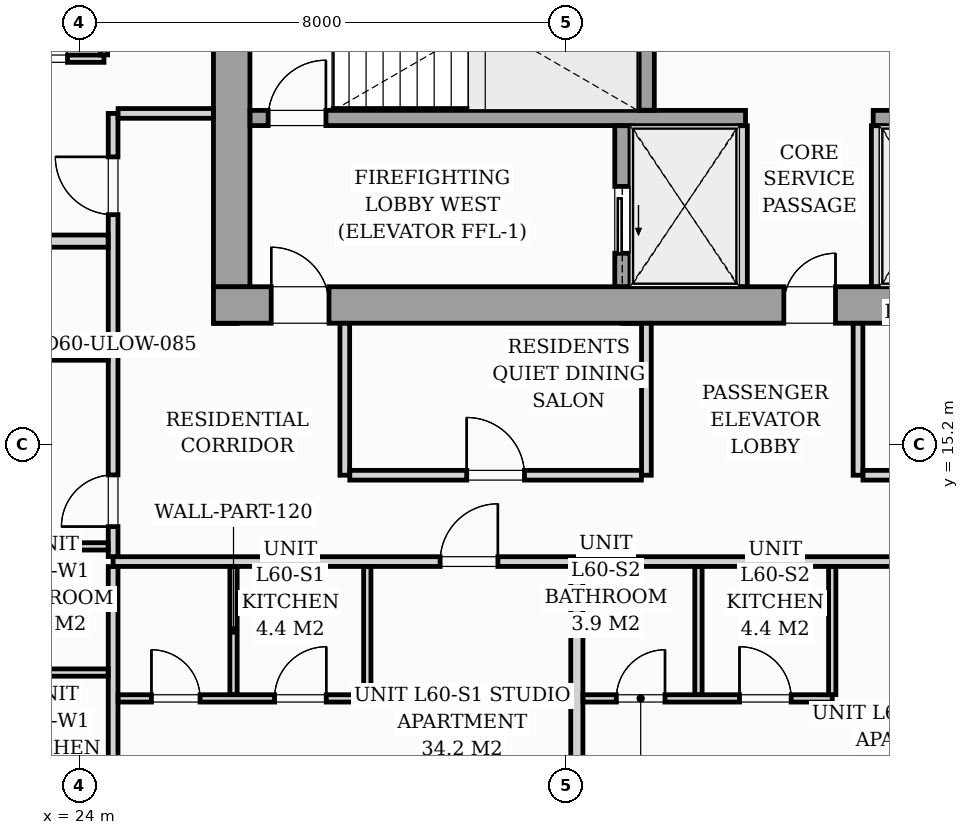
"""IFC4 building model, lengths in metres.
Left out: names, types, materials, properties, quantities, classifications, styles, units other than length and angle.
Written with IfcOpenShell. Run it as: python <this file> out.ifc"""

import sys

from ifc_helpers import new_model, si_unit, direction, frame, frame_2d, origin, origin_2d, place, context, subcontext, project, spatial, rectangle, i_section, extrude, source, transform, mapped, element, fill, save


model = new_model("IFC4")
c1 = context("Model", 3, precision=1e-05, world=origin(), true_north=direction((0.0, 1.0)))
c2 = subcontext(c1, "Body", "Model", "MODEL_VIEW")
j1 = project(units=[si_unit("LENGTHUNIT", "METRE"), si_unit("PLANEANGLEUNIT", "RADIAN")], contexts=[c1])
p1 = place(None, origin())
s1 = spatial("IfcSite", under=j1, at=p1, CompositionType="ELEMENT")
p2 = place(p1, origin())
s2 = spatial("IfcBuilding", under=s1, at=p2, CompositionType="ELEMENT")
p3 = place(p2, frame((0.0, 0.0, 208.2)))
s3 = spatial("IfcBuildingStorey", under=s2, at=p3, CompositionType="ELEMENT", Elevation=208.2)
m1 = source(origin(), c2, "Body", "SweptSolid", [
    extrude(i_section(OverallWidth=0.416, OverallDepth=0.446, WebThickness=0.039, FlangeThickness=0.063, FilletRadius=0.018, at=origin_2d()), origin(), (0.0, 0.0, 1.0), 3.196),
])
for number, where, z_axis, x_axis in (
    (1, (26.4, 17.4, 0.002), (0.0, 0.0, 1.0), (1.0, 0.0, 0.0)),
    (2, (33.12, 17.4, 0.002), (0.0, 0.0, 1.0), (1.0, 0.0, 0.0)),
):
    element("IfcColumn", number, at=place(p3, frame(where, z_axis=z_axis, x_axis=x_axis)), inside=s3, PredefinedType="PILASTER", context=c2, shape_type="MappedRepresentation", body=[
        mapped(m1, transform((0.0, 0.0, 0.0), scale=1.0)),
    ])
p4 = place(p3, frame((26.2, 17.5, 0.0), z_axis=(0.0, 0.0, 1.0), x_axis=(1.0, 0.0, 0.0)))
e3 = element("IfcWall", 3, at=p4, inside=s3, PredefinedType="SHEAR", context=c2, shape_type="SweptSolid", body=[
    extrude(rectangle(XDim=19.6, YDim=0.6, at=frame_2d((9.8, 0.0))), origin(), (0.0, 0.0, 1.0), 3.2),
])
p5 = place(p4, frame((0.95, 0.0, 0.0)))
e4 = element("IfcOpeningElement", 4, at=p5, cuts=e3, PredefinedType="OPENING", context=c2, shape_type="SweptSolid", body=[
    extrude(rectangle(XDim=0.95, YDim=2.06, at=frame_2d((0.475, 1.03))), frame((0.0, 0.31, 0.0), z_axis=(0.0, -1.0, 0.0), x_axis=(1.0, 0.0, 0.0)), (0.0, 0.0, 1.0), 0.62),
])
p6 = place(p4, frame((9.38, 0.0, 0.0)))
e5 = element("IfcOpeningElement", 5, at=p6, cuts=e3, PredefinedType="OPENING", context=c2, shape_type="SweptSolid", body=[
    extrude(rectangle(XDim=0.85, YDim=2.0, at=frame_2d((0.425, 1.0))), frame((0.0, 0.31, 0.0), z_axis=(0.0, -1.0, 0.0), x_axis=(1.0, 0.0, 0.0)), (0.0, 0.0, 1.0), 0.62),
])
p7 = place(p4, frame((17.55, 0.0, 0.0)))
e6 = element("IfcOpeningElement", 6, at=p7, cuts=e3, PredefinedType="OPENING", context=c2, shape_type="SweptSolid", body=[
    extrude(rectangle(XDim=0.95, YDim=2.06, at=frame_2d((0.475, 1.03))), frame((0.0, 0.31, 0.0), z_axis=(0.0, -1.0, 0.0), x_axis=(1.0, 0.0, 0.0)), (0.0, 0.0, 1.0), 0.62),
])
p8 = place(p3, frame((26.5, 17.802, 0.0), z_axis=(0.0, 0.0, 1.0), x_axis=(0.0, 1.0, 0.0)))
e7 = element("IfcWall", 7, at=p8, inside=s3, PredefinedType="SHEAR", context=c2, shape_type="SweptSolid", body=[
    extrude(rectangle(XDim=5.796, YDim=0.6, at=frame_2d((2.898, 0.0))), origin(), (0.0, 0.0, 1.0), 3.2),
])
p9 = place(p3, frame((26.802, 20.575, 0.0), z_axis=(0.0, 0.0, 1.0), x_axis=(1.0, 0.0, 0.0)))
e8 = element("IfcWall", 8, at=p9, inside=s3, PredefinedType="SOLIDWALL", context=c2, shape_type="SweptSolid", body=[
    extrude(rectangle(XDim=8.148, YDim=0.25, at=frame_2d((4.074, 0.0))), origin(), (0.0, 0.0, 1.0), 3.2),
])
p10 = place(p9, frame((0.298, 0.0, 0.0)))
e9 = element("IfcOpeningElement", 9, at=p10, cuts=e8, PredefinedType="OPENING", context=c2, shape_type="SweptSolid", body=[
    extrude(rectangle(XDim=0.95, YDim=2.06, at=frame_2d((0.475, 1.03))), frame((0.0, 0.135, 0.0), z_axis=(0.0, -1.0, 0.0), x_axis=(1.0, 0.0, 0.0)), (0.0, 0.0, 1.0), 0.27),
])
p11 = place(p3, frame((37.05, 20.575, 0.0), z_axis=(0.0, 0.0, 1.0), x_axis=(1.0, 0.0, 0.0)))
e10 = element("IfcWall", 10, at=p11, inside=s3, PredefinedType="SOLIDWALL", context=c2, shape_type="SweptSolid", body=[
    extrude(rectangle(XDim=8.148, YDim=0.25, at=frame_2d((4.074, 0.0))), origin(), (0.0, 0.0, 1.0), 3.2),
])
p12 = place(p11, frame((6.6, 0.0, 0.0)))
e11 = element("IfcOpeningElement", 11, at=p12, cuts=e10, PredefinedType="OPENING", context=c2, shape_type="SweptSolid", body=[
    extrude(rectangle(XDim=0.95, YDim=2.06, at=frame_2d((0.475, 1.03))), frame((0.0, 0.135, 0.0), z_axis=(0.0, -1.0, 0.0), x_axis=(1.0, 0.0, 0.0)), (0.0, 0.0, 1.0), 0.27),
])
p13 = place(p3, frame((33.325, 20.702, 0.0), z_axis=(0.0, 0.0, 1.0), x_axis=(0.0, 1.0, 0.0)))
e12 = element("IfcWall", 12, at=p13, inside=s3, PredefinedType="SOLIDWALL", context=c2, shape_type="SweptSolid", body=[
    extrude(rectangle(XDim=2.896, YDim=0.25, at=frame_2d((1.448, 0.0))), origin(), (0.0, 0.0, 1.0), 3.2),
])
p14 = place(p3, frame((32.925, 17.802, 0.0), z_axis=(0.0, 0.0, 1.0), x_axis=(0.0, 1.0, 0.0)))
e13 = element("IfcWall", 13, at=p14, inside=s3, PredefinedType="SOLIDWALL", context=c2, shape_type="SweptSolid", body=[
    extrude(rectangle(XDim=2.646, YDim=0.25, at=frame_2d((1.323, 0.0))), origin(), (0.0, 0.0, 1.0), 3.2),
])
p15 = place(p14, frame((0.548, 0.0, 0.0)))
e14 = element("IfcOpeningElement", 14, at=p15, cuts=e13, PredefinedType="OPENING", context=c2, shape_type="SweptSolid", body=[
    extrude(rectangle(XDim=1.1, YDim=2.08, at=frame_2d((0.55, 1.04))), frame((0.0, 0.135, 0.0), z_axis=(0.0, -1.0, 0.0), x_axis=(1.0, 0.0, 0.0)), (0.0, 0.0, 1.0), 0.27),
])
for number, where, z_axis, x_axis in (
    (15, (34.9, 17.802, 0.0), (0.0, 0.0, 1.0), (0.0, 1.0, 0.0)),
    (16, (37.1, 17.802, 0.0), (0.0, 0.0, 1.0), (0.0, 1.0, 0.0)),
):
    element("IfcWall", number, at=place(p3, frame(where, z_axis=z_axis, x_axis=x_axis)), inside=s3, PredefinedType="PARTITIONING", context=c2, shape_type="SweptSolid", body=[
        extrude(rectangle(XDim=2.646, YDim=0.16, at=frame_2d((1.323, 0.0))), origin(), (0.0, 0.0, 1.0), 2.9),
    ])
p16 = place(p3, frame((24.55, 13.28, 0.0), z_axis=(0.0, 0.0, 1.0), x_axis=(1.0, 0.0, 0.0)))
e17 = element("IfcWall", 17, at=p16, inside=s3, PredefinedType="PARTITIONING", context=c2, shape_type="SweptSolid", body=[
    extrude(rectangle(XDim=22.9, YDim=0.16, at=frame_2d((11.45, 0.0))), origin(), (0.0, 0.0, 1.0), 2.9),
])
p17 = place(p16, frame((5.378, 0.0, 0.0)))
e18 = element("IfcOpeningElement", 18, at=p17, cuts=e17, PredefinedType="OPENING", context=c2, shape_type="SweptSolid", body=[
    extrude(rectangle(XDim=0.95, YDim=2.06, at=frame_2d((0.475, 1.03))), frame((0.0, 0.09, 0.0), z_axis=(0.0, -1.0, 0.0), x_axis=(1.0, 0.0, 0.0)), (0.0, 0.0, 1.0), 0.18),
])
p18 = place(p16, frame((13.025, 0.0, 0.0)))
e19 = element("IfcOpeningElement", 19, at=p18, cuts=e17, PredefinedType="OPENING", context=c2, shape_type="SweptSolid", body=[
    extrude(rectangle(XDim=0.95, YDim=2.06, at=frame_2d((0.475, 1.03))), frame((0.0, 0.09, 0.0), z_axis=(0.0, -1.0, 0.0), x_axis=(1.0, 0.0, 0.0)), (0.0, 0.0, 1.0), 0.18),
])
p19 = place(p16, frame((16.572, 0.0, 0.0)))
e20 = element("IfcOpeningElement", 20, at=p19, cuts=e17, PredefinedType="OPENING", context=c2, shape_type="SweptSolid", body=[
    extrude(rectangle(XDim=0.95, YDim=2.06, at=frame_2d((0.475, 1.03))), frame((0.0, 0.09, 0.0), z_axis=(0.0, -1.0, 0.0), x_axis=(1.0, 0.0, 0.0)), (0.0, 0.0, 1.0), 0.18),
])
p20 = place(p3, frame((24.55, 7.11, 0.0), z_axis=(0.0, 0.0, 1.0), x_axis=(0.0, 1.0, 0.0)))
e21 = element("IfcWall", 21, at=p20, inside=s3, PredefinedType="PARTITIONING", context=c2, shape_type="SweptSolid", body=[
    extrude(rectangle(XDim=6.088, YDim=0.16, at=frame_2d((3.044, 0.0))), origin(), (0.0, 0.0, 1.0), 2.9),
])
p21 = place(p3, frame((24.55, 13.362, 0.0), z_axis=(0.0, 0.0, 1.0), x_axis=(0.0, 1.0, 0.0)))
e22 = element("IfcWall", 22, at=p21, inside=s3, PredefinedType="PARTITIONING", context=c2, shape_type="SweptSolid", body=[
    extrude(rectangle(XDim=7.288, YDim=0.16, at=frame_2d((3.644, 0.0))), origin(), (0.0, 0.0, 1.0), 2.9),
])
p22 = place(p21, frame((0.493, 0.0, 0.0)))
e23 = element("IfcOpeningElement", 23, at=p22, cuts=e22, PredefinedType="OPENING", context=c2, shape_type="SweptSolid", body=[
    extrude(rectangle(XDim=0.85, YDim=2.0, at=frame_2d((0.425, 1.0))), frame((0.0, 0.09, 0.0), z_axis=(0.0, -1.0, 0.0), x_axis=(1.0, 0.0, 0.0)), (0.0, 0.0, 1.0), 0.18),
])
p23 = place(p21, frame((5.623, 0.0, 0.0)))
e24 = element("IfcOpeningElement", 24, at=p23, cuts=e22, PredefinedType="OPENING", context=c2, shape_type="SweptSolid", body=[
    extrude(rectangle(XDim=0.95, YDim=2.06, at=frame_2d((0.475, 1.03))), frame((0.0, 0.09, 0.0), z_axis=(0.0, -1.0, 0.0), x_axis=(1.0, 0.0, 0.0)), (0.0, 0.0, 1.0), 0.18),
])
p24 = place(p3, frame((24.632, 20.65, 0.0), z_axis=(0.0, 0.0, 1.0), x_axis=(1.0, 0.0, 0.0)))
e25 = element("IfcWall", 25, at=p24, inside=s3, PredefinedType="PARTITIONING", context=c2, shape_type="SweptSolid", body=[
    extrude(rectangle(XDim=1.566, YDim=0.16, at=frame_2d((0.783, 0.0))), origin(), (0.0, 0.0, 1.0), 2.9),
])
p25 = place(p3, frame((24.632, 11.03, 0.0), z_axis=(0.0, 0.0, 1.0), x_axis=(1.0, 0.0, 0.0)))
e26 = element("IfcWall", 26, at=p25, inside=s3, PredefinedType="PARTITIONING", context=c2, shape_type="SweptSolid", body=[
    extrude(rectangle(XDim=4.098, YDim=0.12, at=frame_2d((2.049, 0.0))), origin(), (0.0, 0.0, 1.0), 2.9),
])
p26 = place(p25, frame((0.548, 0.0, 0.0)))
e27 = element("IfcOpeningElement", 27, at=p26, cuts=e26, PredefinedType="OPENING", context=c2, shape_type="SweptSolid", body=[
    extrude(rectangle(XDim=0.8, YDim=2.02, at=frame_2d((0.4, 1.01))), frame((0.0, 0.07, 0.0), z_axis=(0.0, -1.0, 0.0), x_axis=(1.0, 0.0, 0.0)), (0.0, 0.0, 1.0), 0.14),
])
p27 = place(p25, frame((2.573, 0.0, 0.0)))
e28 = element("IfcOpeningElement", 28, at=p27, cuts=e26, PredefinedType="OPENING", context=c2, shape_type="SweptSolid", body=[
    extrude(rectangle(XDim=0.85, YDim=2.05, at=frame_2d((0.425, 1.025))), frame((0.0, 0.07, 0.0), z_axis=(0.0, -1.0, 0.0), x_axis=(1.0, 0.0, 0.0)), (0.0, 0.0, 1.0), 0.14),
])
for number, where, z_axis, x_axis in (
    (29, (28.73, 11.092, 0.0), (0.0, 0.0, 1.0), (0.0, 1.0, 0.0)),
    (30, (26.53, 11.092, 0.0), (0.0, 0.0, 1.0), (0.0, 1.0, 0.0)),
):
    element("IfcWall", number, at=place(p3, frame(where, z_axis=z_axis, x_axis=x_axis)), inside=s3, PredefinedType="PARTITIONING", context=c2, shape_type="SweptSolid", body=[
        extrude(rectangle(XDim=2.106, YDim=0.12, at=frame_2d((1.053, 0.0))), origin(), (0.0, 0.0, 1.0), 2.9),
    ])
p28 = place(p3, frame((32.176, 7.844, 0.0), z_axis=(0.0, 0.0, 1.0), x_axis=(0.0, 1.0, 0.0)))
e31 = element("IfcWall", 31, at=p28, inside=s3, PredefinedType="PARTITIONING", context=c2, shape_type="SweptSolid", body=[
    extrude(rectangle(XDim=5.354, YDim=0.2, at=frame_2d((2.677, 0.0))), origin(), (0.0, 0.0, 1.0), 2.9),
])
p29 = place(p3, frame((32.278, 11.03, 0.0), z_axis=(0.0, 0.0, 1.0), x_axis=(1.0, 0.0, 0.0)))
e32 = element("IfcWall", 32, at=p29, inside=s3, PredefinedType="PARTITIONING", context=c2, shape_type="SweptSolid", body=[
    extrude(rectangle(XDim=4.098, YDim=0.12, at=frame_2d((2.049, 0.0))), origin(), (0.0, 0.0, 1.0), 2.9),
])
p30 = place(p29, frame((0.548, 0.0, 0.0)))
e33 = element("IfcOpeningElement", 33, at=p30, cuts=e32, PredefinedType="OPENING", context=c2, shape_type="SweptSolid", body=[
    extrude(rectangle(XDim=0.8, YDim=2.02, at=frame_2d((0.4, 1.01))), frame((0.0, 0.07, 0.0), z_axis=(0.0, -1.0, 0.0), x_axis=(1.0, 0.0, 0.0)), (0.0, 0.0, 1.0), 0.14),
])
p31 = place(p29, frame((2.573, 0.0, 0.0)))
e34 = element("IfcOpeningElement", 34, at=p31, cuts=e32, PredefinedType="OPENING", context=c2, shape_type="SweptSolid", body=[
    extrude(rectangle(XDim=0.85, YDim=2.05, at=frame_2d((0.425, 1.025))), frame((0.0, 0.07, 0.0), z_axis=(0.0, -1.0, 0.0), x_axis=(1.0, 0.0, 0.0)), (0.0, 0.0, 1.0), 0.14),
])
for number, where, z_axis, x_axis in (
    (35, (36.376, 11.092, 0.0), (0.0, 0.0, 1.0), (0.0, 1.0, 0.0)),
    (36, (34.176, 11.092, 0.0), (0.0, 0.0, 1.0), (0.0, 1.0, 0.0)),
):
    element("IfcWall", number, at=place(p3, frame(where, z_axis=z_axis, x_axis=x_axis)), inside=s3, PredefinedType="PARTITIONING", context=c2, shape_type="SweptSolid", body=[
        extrude(rectangle(XDim=2.106, YDim=0.12, at=frame_2d((1.053, 0.0))), origin(), (0.0, 0.0, 1.0), 2.9),
    ])
p32 = place(p3, frame((13.561, 18.55, 0.0), z_axis=(0.0, 0.0, 1.0), x_axis=(1.0, 0.0, 0.0)))
e37 = element("IfcWall", 37, at=p32, inside=s3, PredefinedType="PARTITIONING", context=c2, shape_type="SweptSolid", body=[
    extrude(rectangle(XDim=10.907, YDim=0.2, at=frame_2d((5.453, 0.0))), origin(), (0.0, 0.0, 1.0), 2.9),
])
for number, where, z_axis, x_axis in (
    (38, (22.212, 11.455, 0.0), (0.0, 0.0, 1.0), (1.0, 0.0, 0.0)),
    (39, (22.212, 13.53, 0.0), (0.0, 0.0, 1.0), (1.0, 0.0, 0.0)),
):
    element("IfcWall", number, at=place(p3, frame(where, z_axis=z_axis, x_axis=x_axis)), inside=s3, PredefinedType="PARTITIONING", context=c2, shape_type="SweptSolid", body=[
        extrude(rectangle(XDim=2.256, YDim=0.12, at=frame_2d((1.128, 0.0))), origin(), (0.0, 0.0, 1.0), 2.9),
    ])
p33 = place(p3, frame((16.813, 16.651, 0.0), z_axis=(0.0, 0.0, 1.0), x_axis=(1.0, 0.0, 0.0)))
e40 = element("IfcWall", 40, at=p33, inside=s3, PredefinedType="PARTITIONING", context=c2, shape_type="SweptSolid", body=[
    extrude(rectangle(XDim=7.655, YDim=0.12, at=frame_2d((3.828, 0.0))), origin(), (0.0, 0.0, 1.0), 2.241),
])
p34 = place(p33, frame((3.403, 0.0, 0.0)))
e41 = element("IfcOpeningElement", 41, at=p34, cuts=e40, PredefinedType="OPENING", context=c2, shape_type="SweptSolid", body=[
    extrude(rectangle(XDim=0.85, YDim=2.05, at=frame_2d((0.425, 1.025))), frame((0.0, 0.07, 0.0), z_axis=(0.0, -1.0, 0.0), x_axis=(1.0, 0.0, 0.0)), (0.0, 0.0, 1.0), 0.14),
])
p35 = place(p3, frame((20.2, 21.55, 0.0), z_axis=(0.0, 0.0, 1.0), x_axis=(1.0, 0.0, 0.0)))
e42 = element("IfcWall", 42, at=p35, inside=s3, PredefinedType="PARTITIONING", context=c2, shape_type="SweptSolid", body=[
    extrude(rectangle(XDim=4.2, YDim=0.12, at=frame_2d((2.1, 0.0))), origin(), (0.0, 0.0, 1.0), 2.9),
])
p36 = place(p35, frame((0.675, 0.0, 0.0)))
e43 = element("IfcOpeningElement", 43, at=p36, cuts=e42, PredefinedType="OPENING", context=c2, shape_type="SweptSolid", body=[
    extrude(rectangle(XDim=0.85, YDim=2.05, at=frame_2d((0.425, 1.025))), frame((0.0, 0.07, 0.0), z_axis=(0.0, -1.0, 0.0), x_axis=(1.0, 0.0, 0.0)), (0.0, 0.0, 1.0), 0.14),
])
p37 = place(p35, frame((2.8, 0.0, 0.0)))
e44 = element("IfcOpeningElement", 44, at=p37, cuts=e42, PredefinedType="OPENING", context=c2, shape_type="SweptSolid", body=[
    extrude(rectangle(XDim=0.8, YDim=2.02, at=frame_2d((0.4, 1.01))), frame((0.0, 0.07, 0.0), z_axis=(0.0, -1.0, 0.0), x_axis=(1.0, 0.0, 0.0)), (0.0, 0.0, 1.0), 0.14),
])
p38 = place(p3, frame((24.4, 21.612, 0.0), z_axis=(0.0, 0.0, 1.0), x_axis=(0.0, 1.0, 0.0)))
e45 = element("IfcWall", 45, at=p38, inside=s3, PredefinedType="PARTITIONING", context=c2, shape_type="SweptSolid", body=[
    extrude(rectangle(XDim=2.126, YDim=0.12, at=frame_2d((1.063, 0.0))), origin(), (0.0, 0.0, 1.0), 2.9),
])
for number, where, z_axis, x_axis in (
    (46, (28.36, 14.7, 0.0), (0.0, 0.0, 1.0), (0.0, 1.0, 0.0)),
    (47, (33.32, 14.7, 0.0), (0.0, 0.0, 1.0), (0.0, 1.0, 0.0)),
):
    element("IfcWall", number, at=place(p3, frame(where, z_axis=z_axis, x_axis=x_axis)), inside=s3, PredefinedType="PARTITIONING", context=c2, shape_type="SweptSolid", body=[
        extrude(rectangle(XDim=2.498, YDim=0.16, at=frame_2d((1.249, 0.0))), origin(), (0.0, 0.0, 1.0), 2.9),
    ])
p39 = place(p3, frame((28.442, 14.7, 0.0), z_axis=(0.0, 0.0, 1.0), x_axis=(1.0, 0.0, 0.0)))
e48 = element("IfcWall", 48, at=p39, inside=s3, PredefinedType="PARTITIONING", context=c2, shape_type="SweptSolid", body=[
    extrude(rectangle(XDim=4.796, YDim=0.16, at=frame_2d((2.398, 0.0))), origin(), (0.0, 0.0, 1.0), 2.9),
])
p40 = place(p39, frame((1.923, 0.0, 0.0)))
e49 = element("IfcOpeningElement", 49, at=p40, cuts=e48, PredefinedType="OPENING", context=c2, shape_type="SweptSolid", body=[
    extrude(rectangle(XDim=0.95, YDim=2.06, at=frame_2d((0.475, 1.03))), frame((0.0, 0.09, 0.0), z_axis=(0.0, -1.0, 0.0), x_axis=(1.0, 0.0, 0.0)), (0.0, 0.0, 1.0), 0.18),
])
p41 = place(p3, frame((36.8, 14.7, 0.0), z_axis=(0.0, 0.0, 1.0), x_axis=(0.0, 1.0, 0.0)))
e50 = element("IfcWall", 50, at=p41, inside=s3, PredefinedType="PARTITIONING", context=c2, shape_type="SweptSolid", body=[
    extrude(rectangle(XDim=2.498, YDim=0.16, at=frame_2d((1.249, 0.0))), origin(), (0.0, 0.0, 1.0), 2.9),
])
p42 = place(p3, frame((36.882, 14.7, 0.0), z_axis=(0.0, 0.0, 1.0), x_axis=(1.0, 0.0, 0.0)))
e51 = element("IfcWall", 51, at=p42, inside=s3, PredefinedType="PARTITIONING", context=c2, shape_type="SweptSolid", body=[
    extrude(rectangle(XDim=2.018, YDim=0.16, at=frame_2d((1.009, 0.0))), origin(), (0.0, 0.0, 1.0), 2.9),
])
p43 = place(p42, frame((0.483, 0.0, 0.0)))
e52 = element("IfcOpeningElement", 52, at=p43, cuts=e51, PredefinedType="OPENING", context=c2, shape_type="SweptSolid", body=[
    extrude(rectangle(XDim=0.95, YDim=2.06, at=frame_2d((0.475, 1.03))), frame((0.0, 0.09, 0.0), z_axis=(0.0, -1.0, 0.0), x_axis=(1.0, 0.0, 0.0)), (0.0, 0.0, 1.0), 0.18),
])
m2 = source(origin(), c2, "Body", "SweptSolid", [
    extrude(rectangle(XDim=0.95, YDim=2.06, at=frame_2d((0.475, 1.03))), frame((0.0, 0.025, 0.0), z_axis=(0.0, -1.0, 0.0), x_axis=(1.0, 0.0, 0.0)), (0.0, 0.0, 1.0), 0.05),
])
p44 = place(p5, origin())
e53 = element("IfcDoor", 53, at=p44, inside=s3, OperationType="SINGLE_SWING_LEFT", PredefinedType="DOOR", context=c2, shape_type="MappedRepresentation", body=[
    mapped(m2, transform((0.0, 0.0, 0.0), scale=1.0)),
])
fill(e4, e53)
m3 = source(origin(), c2, "Body", "SweptSolid", [
    extrude(rectangle(XDim=0.85, YDim=2.0, at=frame_2d((0.425, 1.0))), frame((0.0, 0.025, 0.0), z_axis=(0.0, -1.0, 0.0), x_axis=(1.0, 0.0, 0.0)), (0.0, 0.0, 1.0), 0.05),
])
p45 = place(p6, origin())
e54 = element("IfcDoor", 54, at=p45, inside=s3, OperationType="SINGLE_SWING_RIGHT", PredefinedType="DOOR", context=c2, shape_type="MappedRepresentation", body=[
    mapped(m3, transform((0.0, 0.0, 0.0), scale=1.0)),
])
fill(e5, e54)
p46 = place(p10, origin())
e55 = element("IfcDoor", 55, at=p46, inside=s3, OperationType="SINGLE_SWING_RIGHT", PredefinedType="DOOR", context=c2, shape_type="MappedRepresentation", body=[
    mapped(m2, transform((0.0, 0.0, 0.0), scale=1.0)),
])
fill(e9, e55)
m4 = source(origin(), c2, "Body", "SweptSolid", [
    extrude(rectangle(XDim=1.1, YDim=2.08, at=frame_2d((0.55, 1.04))), frame((0.0, 0.025, 0.0), z_axis=(0.0, -1.0, 0.0), x_axis=(1.0, 0.0, 0.0)), (0.0, 0.0, 1.0), 0.05),
])
p47 = place(p15, origin())
e56 = element("IfcDoor", 56, at=p47, inside=s3, OperationType="SLIDING_TO_LEFT", PredefinedType="DOOR", context=c2, shape_type="MappedRepresentation", body=[
    mapped(m4, transform((0.0, 0.0, 0.0), scale=1.0)),
])
fill(e14, e56)
m5 = source(origin(), c2, "Body", "SweptSolid", [
    extrude(rectangle(XDim=0.95, YDim=2.06, at=frame_2d((0.475, 1.03))), frame((0.0, 0.025, 0.0), z_axis=(0.0, -1.0, 0.0), x_axis=(1.0, 0.0, 0.0)), (0.0, 0.0, 1.0), 0.05),
])
p48 = place(p17, origin())
e57 = element("IfcDoor", 57, at=p48, inside=s3, OperationType="SINGLE_SWING_RIGHT", PredefinedType="DOOR", context=c2, shape_type="MappedRepresentation", body=[
    mapped(m5, transform((0.0, 0.0, 0.0), scale=1.0)),
])
fill(e18, e57)
m6 = source(origin(), c2, "Body", "SweptSolid", [
    extrude(rectangle(XDim=0.8, YDim=2.02, at=frame_2d((0.4, 1.01))), frame((0.0, 0.025, 0.0), z_axis=(0.0, -1.0, 0.0), x_axis=(1.0, 0.0, 0.0)), (0.0, 0.0, 1.0), 0.05),
])
p49 = place(p26, origin())
e58 = element("IfcDoor", 58, at=p49, inside=s3, OperationType="SINGLE_SWING_LEFT", PredefinedType="DOOR", context=c2, shape_type="MappedRepresentation", body=[
    mapped(m6, transform((0.0, 0.0, 0.0), scale=1.0)),
])
fill(e27, e58)
m7 = source(origin(), c2, "Body", "SweptSolid", [
    extrude(rectangle(XDim=0.85, YDim=2.05, at=frame_2d((0.425, 1.025))), frame((0.0, 0.025, 0.0), z_axis=(0.0, -1.0, 0.0), x_axis=(1.0, 0.0, 0.0)), (0.0, 0.0, 1.0), 0.05),
])
p50 = place(p27, origin())
e59 = element("IfcDoor", 59, at=p50, inside=s3, OperationType="SINGLE_SWING_RIGHT", PredefinedType="DOOR", context=c2, shape_type="MappedRepresentation", body=[
    mapped(m7, transform((0.0, 0.0, 0.0), scale=1.0)),
])
fill(e28, e59)
p51 = place(p30, origin())
e60 = element("IfcDoor", 60, at=p51, inside=s3, OperationType="SINGLE_SWING_RIGHT", PredefinedType="DOOR", context=c2, shape_type="MappedRepresentation", body=[
    mapped(m6, transform((0.0, 0.0, 0.0), scale=1.0)),
])
fill(e33, e60)
p52 = place(p31, origin())
e61 = element("IfcDoor", 61, at=p52, inside=s3, OperationType="SINGLE_SWING_LEFT", PredefinedType="DOOR", context=c2, shape_type="MappedRepresentation", body=[
    mapped(m7, transform((0.0, 0.0, 0.0), scale=1.0)),
])
fill(e34, e61)
p53 = place(p22, origin())
e62 = element("IfcDoor", 62, at=p53, inside=s3, OperationType="SINGLE_SWING_LEFT", PredefinedType="DOOR", context=c2, shape_type="MappedRepresentation", body=[
    mapped(m3, transform((0.0, 0.0, 0.0), scale=1.0)),
])
fill(e23, e62)
p54 = place(p23, origin())
e63 = element("IfcDoor", 63, at=p54, inside=s3, OperationType="SINGLE_SWING_RIGHT", PredefinedType="DOOR", context=c2, shape_type="MappedRepresentation", body=[
    mapped(m5, transform((0.0, 0.0, 0.0), scale=1.0)),
])
fill(e24, e63)
p55 = place(p37, origin())
e64 = element("IfcDoor", 64, at=p55, inside=s3, OperationType="SINGLE_SWING_LEFT", PredefinedType="DOOR", context=c2, shape_type="MappedRepresentation", body=[
    mapped(m6, transform((0.0, 0.0, 0.0), scale=1.0)),
])
fill(e44, e64)
p56 = place(p40, origin())
e65 = element("IfcDoor", 65, at=p56, inside=s3, OperationType="SINGLE_SWING_LEFT", PredefinedType="DOOR", context=c2, shape_type="MappedRepresentation", body=[
    mapped(m5, transform((0.0, 0.0, 0.0), scale=1.0)),
])
fill(e49, e65)
save(model, sys.argv[1])
